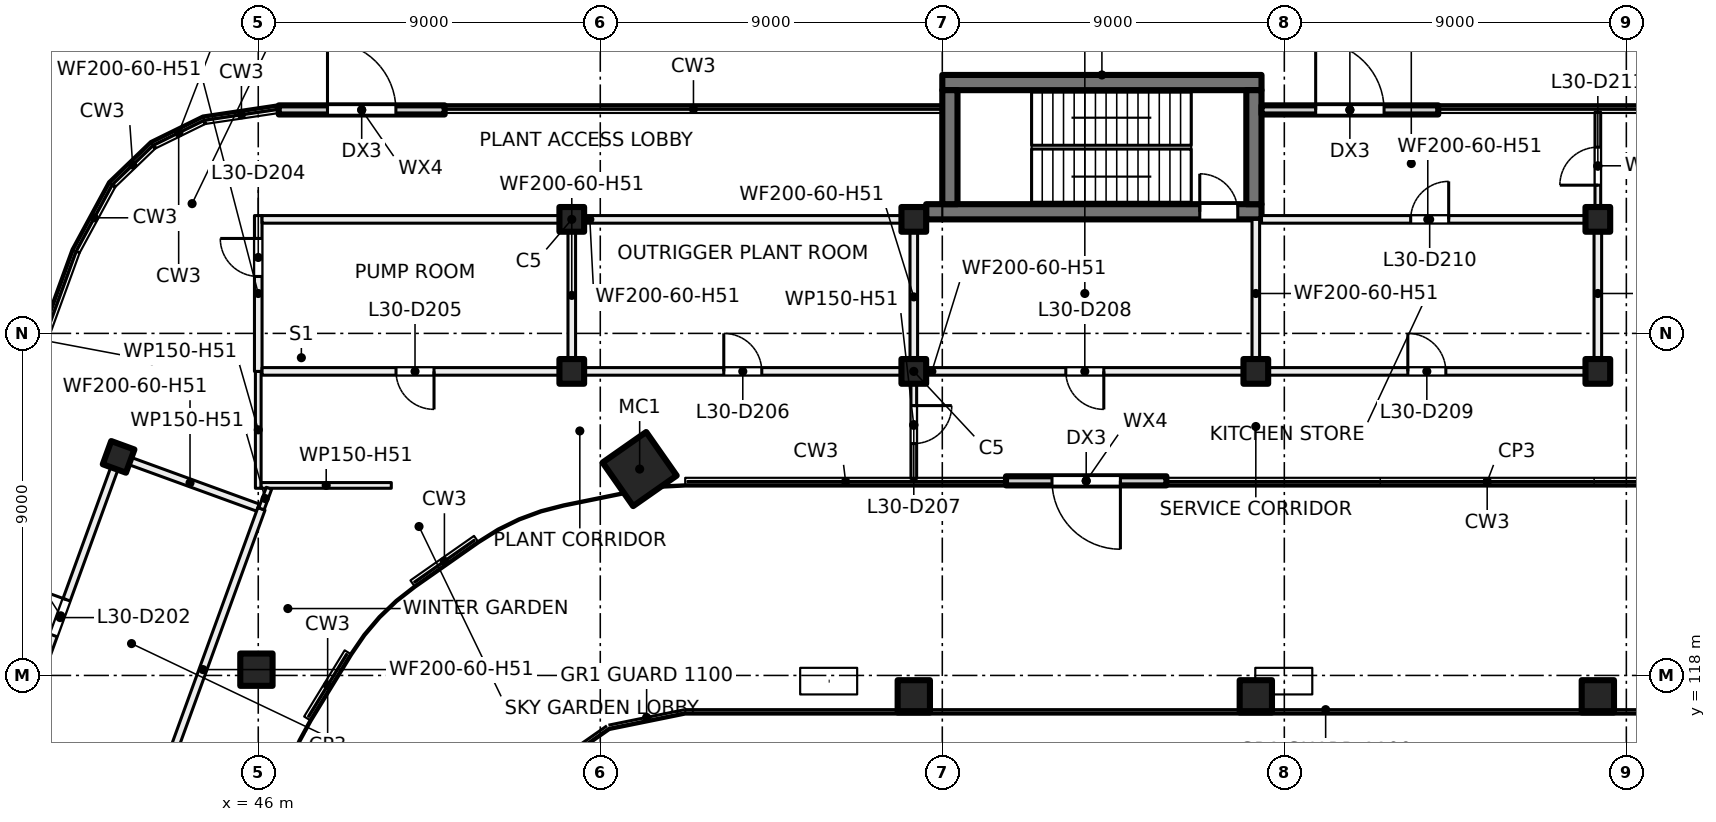
"""IFC4 building model, lengths in metres.
Left out: names, types, materials, properties, quantities, classifications, styles, units other than length and angle.
Written with IfcOpenShell. Run it as: python <this file> out.ifc"""

import sys

from ifc_helpers import new_model, si_unit, direction, frame, frame_2d, origin, origin_2d, place, context, subcontext, project, spatial, rectangle, hollow_rectangle, extrude, element, fill, save


model = new_model("IFC4")
c1 = context("Model", 3, precision=1e-05, world=origin(), true_north=direction((0.0, 1.0)))
c2 = subcontext(c1, "Body", "Model", "MODEL_VIEW")
j1 = project(units=[si_unit("LENGTHUNIT", "METRE"), si_unit("PLANEANGLEUNIT", "RADIAN")], contexts=[c1])
p1 = place(None, origin())
s1 = spatial("IfcSite", under=j1, at=p1, CompositionType="ELEMENT")
p2 = place(p1, origin())
s2 = spatial("IfcBuilding", under=s1, at=p2, CompositionType="ELEMENT")
p3 = place(p2, frame((0.0, 0.0, 129.0)))
s3 = spatial("IfcBuildingStorey", under=s2, at=p3, CompositionType="ELEMENT", Elevation=129.0)
p4 = place(p3, frame((56.036, 123.43, 0.0), z_axis=(0.0, 0.0, 1.0), x_axis=(0.573576436351, -0.819152044289, 0.0)))
e1 = element("IfcColumn", 1, at=p4, inside=s3, PredefinedType="COLUMN", context=c2, shape_type="SweptSolid", body=[
    extrude(hollow_rectangle(XDim=1.4, YDim=1.4, WallThickness=0.04, at=origin_2d()), origin(), (0.0, 0.0, 1.0), 5.5),
])
for number, where, z_axis, x_axis in (
    (2, (54.25, 130.0, 0.0), (0.0, 0.0, 1.0), (1.0, 0.0, 0.0)),
    (3, (63.25, 130.0, 0.0), (0.0, 0.0, 1.0), (1.0, 0.0, 0.0)),
    (4, (81.25, 130.0, 0.0), (0.0, 0.0, 1.0), (1.0, 0.0, 0.0)),
    (5, (54.25, 126.0, 0.0), (0.0, 0.0, 1.0), (1.0, 0.0, 0.0)),
    (6, (63.25, 126.0, 0.0), (0.0, 0.0, 1.0), (1.0, 0.0, 0.0)),
    (7, (72.25, 126.0, 0.0), (0.0, 0.0, 1.0), (1.0, 0.0, 0.0)),
    (8, (81.25, 126.0, 0.0), (0.0, 0.0, 1.0), (1.0, 0.0, 0.0)),
):
    element("IfcColumn", number, at=place(p3, frame(where, z_axis=z_axis, x_axis=x_axis)), inside=s3, PredefinedType="COLUMN", context=c2, shape_type="SweptSolid", body=[
        extrude(rectangle(XDim=0.65, YDim=0.65, at=origin_2d()), origin(), (0.0, 0.0, 1.0), 5.5),
    ])
for number, where, z_axis, x_axis in (
    (9, (45.952, 118.152, 0.0), (0.0, 0.0, 1.0), (1.0, 0.0, 0.0)),
    (10, (63.25, 117.45, 0.0), (0.0, 0.0, 1.0), (1.0, 0.0, 0.0)),
    (11, (72.25, 117.45, 0.0), (0.0, 0.0, 1.0), (1.0, 0.0, 0.0)),
    (12, (81.25, 117.45, 0.0), (0.0, 0.0, 1.0), (1.0, 0.0, 0.0)),
):
    element("IfcColumn", number, at=place(p3, frame(where, z_axis=z_axis, x_axis=x_axis)), inside=s3, PredefinedType="COLUMN", context=c2, shape_type="SweptSolid", body=[
        extrude(rectangle(XDim=0.85, YDim=0.85, at=origin_2d()), origin(), (0.0, 0.0, 1.0), 5.5),
    ])
p5 = place(p3, frame((42.325, 123.751, 0.0), z_axis=(0.0, 0.0, 1.0), x_axis=(-0.342020143326, -0.939692620786, 0.0)))
e13 = element("IfcColumn", 13, at=p5, inside=s3, PredefinedType="COLUMN", context=c2, shape_type="SweptSolid", body=[
    extrude(rectangle(XDim=0.65, YDim=0.65, at=origin_2d()), origin(), (0.0, 0.0, 1.0), 5.5),
])
p6 = place(p3, frame((63.575, 130.2, 0.0), z_axis=(0.0, 0.0, 1.0), x_axis=(1.0, 0.0, 0.0)))
e14 = element("IfcWall", 14, at=p6, inside=s3, PredefinedType="SHEAR", context=c2, shape_type="SweptSolid", body=[
    extrude(rectangle(XDim=8.825, YDim=0.4, at=frame_2d((4.413, 0.0))), origin(), (0.0, 0.0, 1.0), 5.5),
])
p7 = place(p6, frame((7.2, 0.0, 0.0)))
e15 = element("IfcOpeningElement", 15, at=p7, cuts=e14, PredefinedType="OPENING", context=c2, shape_type="SweptSolid", body=[
    extrude(rectangle(XDim=1.0, YDim=2.1, at=frame_2d((0.5, 1.05))), frame((0.0, 0.21, 0.0), z_axis=(0.0, -1.0, 0.0), x_axis=(1.0, 0.0, 0.0)), (0.0, 0.0, 1.0), 0.42),
])
p8 = place(p3, frame((64.0, 133.6, 0.0), z_axis=(0.0, 0.0, 1.0), x_axis=(1.0, 0.0, 0.0)))
e16 = element("IfcWall", 16, at=p8, inside=s3, PredefinedType="SHEAR", context=c2, shape_type="SweptSolid", body=[
    extrude(rectangle(XDim=8.4, YDim=0.4, at=frame_2d((4.2, 0.0))), origin(), (0.0, 0.0, 1.0), 5.5),
])
for number, where, z_axis, x_axis in (
    (17, (64.2, 130.4, 0.0), (0.0, 0.0, 1.0), (0.0, 1.0, 0.0)),
    (18, (72.2, 130.4, 0.0), (0.0, 0.0, 1.0), (0.0, 1.0, 0.0)),
):
    element("IfcWall", number, at=place(p3, frame(where, z_axis=z_axis, x_axis=x_axis)), inside=s3, PredefinedType="SHEAR", context=c2, shape_type="SweptSolid", body=[
        extrude(rectangle(XDim=3.0, YDim=0.4, at=frame_2d((1.5, 0.0))), origin(), (0.0, 0.0, 1.0), 5.5),
    ])
p9 = place(p3, frame((69.897, 123.12, 0.0), z_axis=(0.0, 0.0, 1.0), x_axis=(-1.0, 0.0, 0.0)))
e19 = element("IfcWall", 19, at=p9, inside=s3, PredefinedType="SOLIDWALL", context=c2, shape_type="SweptSolid", body=[
    extrude(rectangle(XDim=4.221, YDim=0.24, at=frame_2d((2.11, 0.0))), origin(), (0.0, 0.0, 1.0), 5.125),
])
p10 = place(p9, frame((1.21, 0.0, 0.0)))
e20 = element("IfcOpeningElement", 20, at=p10, cuts=e19, PredefinedType="OPENING", context=c2, shape_type="SweptSolid", body=[
    extrude(rectangle(XDim=1.8, YDim=2.4, at=frame_2d((0.9, 1.2))), frame((0.0, 0.13, 0.0), z_axis=(0.0, -1.0, 0.0), x_axis=(1.0, 0.0, 0.0)), (0.0, 0.0, 1.0), 0.26),
])
p11 = place(p3, frame((72.4, 132.88, 0.0), z_axis=(0.0, 0.0, 1.0), x_axis=(1.0, 0.0, 0.0)))
e21 = element("IfcWall", 21, at=p11, inside=s3, PredefinedType="SOLIDWALL", context=c2, shape_type="SweptSolid", body=[
    extrude(rectangle(XDim=4.65, YDim=0.24, at=frame_2d((2.325, 0.0))), origin(), (0.0, 0.0, 1.0), 5.125),
])
p12 = place(p11, frame((1.425, 0.0, 0.0)))
e22 = element("IfcOpeningElement", 22, at=p12, cuts=e21, PredefinedType="OPENING", context=c2, shape_type="SweptSolid", body=[
    extrude(rectangle(XDim=1.8, YDim=2.4, at=frame_2d((0.9, 1.2))), frame((0.0, 0.13, 0.0), z_axis=(0.0, -1.0, 0.0), x_axis=(1.0, 0.0, 0.0)), (0.0, 0.0, 1.0), 0.26),
])
p13 = place(p3, frame((46.539, 132.88, 0.0), z_axis=(0.0, 0.0, 1.0), x_axis=(1.0, 0.0, 0.0)))
e23 = element("IfcWall", 23, at=p13, inside=s3, PredefinedType="SOLIDWALL", context=c2, shape_type="SweptSolid", body=[
    extrude(rectangle(XDim=4.365, YDim=0.24, at=frame_2d((2.183, 0.0))), origin(), (0.0, 0.0, 1.0), 5.125),
])
p14 = place(p13, frame((1.283, 0.0, 0.0)))
e24 = element("IfcOpeningElement", 24, at=p14, cuts=e23, PredefinedType="OPENING", context=c2, shape_type="SweptSolid", body=[
    extrude(rectangle(XDim=1.8, YDim=2.4, at=frame_2d((0.9, 1.2))), frame((0.0, 0.13, 0.0), z_axis=(0.0, -1.0, 0.0), x_axis=(1.0, 0.0, 0.0)), (0.0, 0.0, 1.0), 0.26),
])
p15 = place(p3, frame((42.359, 123.845, 0.0), z_axis=(0.0, 0.0, 1.0), x_axis=(-0.341936915144, -0.939722909193, 0.0)))
e25 = element("IfcWall", 25, at=p15, inside=s3, PredefinedType="PARTITIONING", context=c2, shape_type="SweptSolid", body=[
    extrude(rectangle(XDim=9.101, YDim=0.2, at=frame_2d((4.55, 0.0))), origin(), (0.0, 0.0, 1.0), 5.125),
])
p16 = place(p15, frame((4.1, 0.0, 0.0)))
e26 = element("IfcOpeningElement", 26, at=p16, cuts=e25, PredefinedType="OPENING", context=c2, shape_type="SweptSolid", body=[
    extrude(rectangle(XDim=1.0, YDim=2.1, at=frame_2d((0.5, 1.05))), frame((0.0, 0.11, 0.0), z_axis=(0.0, -1.0, 0.0), x_axis=(1.0, 0.0, 0.0)), (0.0, 0.0, 1.0), 0.22),
])
p17 = place(p3, frame((42.419, 123.717, 0.0), z_axis=(0.0, 0.0, 1.0), x_axis=(0.939667689469, -0.342088633789, 0.0)))
e27 = element("IfcWall", 27, at=p17, inside=s3, PredefinedType="PARTITIONING", context=c2, shape_type="SweptSolid", body=[
    extrude(rectangle(XDim=3.8, YDim=0.2, at=frame_2d((1.9, 0.0))), origin(), (0.0, 0.0, 1.0), 5.125),
])
p18 = place(p3, frame((43.006, 113.925, 0.0), z_axis=(0.0, 0.0, 1.0), x_axis=(0.341963022424, 0.939713409128, 0.0)))
e28 = element("IfcWall", 28, at=p18, inside=s3, PredefinedType="PARTITIONING", context=c2, shape_type="SweptSolid", body=[
    extrude(rectangle(XDim=9.001, YDim=0.2, at=frame_2d((4.5, 0.0))), origin(), (0.0, 0.0, 1.0), 5.125),
])
p19 = place(p3, frame((46.0, 122.925, 0.0), z_axis=(0.0, 0.0, 1.0), x_axis=(0.0, 1.0, 0.0)))
e29 = element("IfcWall", 29, at=p19, inside=s3, PredefinedType="PARTITIONING", context=c2, shape_type="SweptSolid", body=[
    extrude(rectangle(XDim=3.075, YDim=0.15, at=frame_2d((1.538, 0.0))), origin(), (0.0, 0.0, 1.0), 5.125),
])
p20 = place(p3, frame((46.075, 123.0, 0.0), z_axis=(0.0, 0.0, 1.0), x_axis=(1.0, 0.0, 0.0)))
e30 = element("IfcWall", 30, at=p20, inside=s3, PredefinedType="PARTITIONING", context=c2, shape_type="SweptSolid", body=[
    extrude(rectangle(XDim=3.426, YDim=0.15, at=frame_2d((1.713, 0.0))), origin(), (0.0, 0.0, 1.0), 5.125),
])
p21 = place(p3, frame((46.0, 130.1, 0.0), z_axis=(0.0, 0.0, 1.0), x_axis=(0.0, -1.0, 0.0)))
e31 = element("IfcWall", 31, at=p21, inside=s3, PredefinedType="PARTITIONING", context=c2, shape_type="SweptSolid", body=[
    extrude(rectangle(XDim=4.1, YDim=0.2, at=frame_2d((2.05, 0.0))), origin(), (0.0, 0.0, 1.0), 5.125),
])
p22 = place(p21, frame((0.602, 0.0, 0.0)))
e32 = element("IfcOpeningElement", 32, at=p22, cuts=e31, PredefinedType="OPENING", context=c2, shape_type="SweptSolid", body=[
    extrude(rectangle(XDim=1.0, YDim=2.1, at=frame_2d((0.5, 1.05))), frame((0.0, 0.11, 0.0), z_axis=(0.0, -1.0, 0.0), x_axis=(1.0, 0.0, 0.0)), (0.0, 0.0, 1.0), 0.22),
])
p23 = place(p3, frame((46.1, 126.0, 0.0), z_axis=(0.0, 0.0, 1.0), x_axis=(1.0, 0.0, 0.0)))
e33 = element("IfcWall", 33, at=p23, inside=s3, PredefinedType="PARTITIONING", context=c2, shape_type="SweptSolid", body=[
    extrude(rectangle(XDim=35.25, YDim=0.2, at=frame_2d((17.625, 0.0))), origin(), (0.0, 0.0, 1.0), 5.125),
])
p24 = place(p23, frame((3.525, 0.0, 0.0)))
e34 = element("IfcOpeningElement", 34, at=p24, cuts=e33, PredefinedType="OPENING", context=c2, shape_type="SweptSolid", body=[
    extrude(rectangle(XDim=1.0, YDim=2.1, at=frame_2d((0.5, 1.05))), frame((0.0, 0.11, 0.0), z_axis=(0.0, -1.0, 0.0), x_axis=(1.0, 0.0, 0.0)), (0.0, 0.0, 1.0), 0.22),
])
p25 = place(p23, frame((12.15, 0.0, 0.0)))
e35 = element("IfcOpeningElement", 35, at=p25, cuts=e33, PredefinedType="OPENING", context=c2, shape_type="SweptSolid", body=[
    extrude(rectangle(XDim=1.0, YDim=2.1, at=frame_2d((0.5, 1.05))), frame((0.0, 0.11, 0.0), z_axis=(0.0, -1.0, 0.0), x_axis=(1.0, 0.0, 0.0)), (0.0, 0.0, 1.0), 0.22),
])
p26 = place(p23, frame((21.15, 0.0, 0.0)))
e36 = element("IfcOpeningElement", 36, at=p26, cuts=e33, PredefinedType="OPENING", context=c2, shape_type="SweptSolid", body=[
    extrude(rectangle(XDim=1.0, YDim=2.1, at=frame_2d((0.5, 1.05))), frame((0.0, 0.11, 0.0), z_axis=(0.0, -1.0, 0.0), x_axis=(1.0, 0.0, 0.0)), (0.0, 0.0, 1.0), 0.22),
])
p27 = place(p23, frame((30.15, 0.0, 0.0)))
e37 = element("IfcOpeningElement", 37, at=p27, cuts=e33, PredefinedType="OPENING", context=c2, shape_type="SweptSolid", body=[
    extrude(rectangle(XDim=1.0, YDim=2.1, at=frame_2d((0.5, 1.05))), frame((0.0, 0.11, 0.0), z_axis=(0.0, -1.0, 0.0), x_axis=(1.0, 0.0, 0.0)), (0.0, 0.0, 1.0), 0.22),
])
p28 = place(p3, frame((46.1, 130.0, 0.0), z_axis=(0.0, 0.0, 1.0), x_axis=(1.0, 0.0, 0.0)))
e38 = element("IfcWall", 38, at=p28, inside=s3, PredefinedType="PARTITIONING", context=c2, shape_type="SweptSolid", body=[
    extrude(rectangle(XDim=17.25, YDim=0.2, at=frame_2d((8.625, 0.0))), origin(), (0.0, 0.0, 1.0), 5.125),
])
p29 = place(p3, frame((46.084, 122.383, 0.0), z_axis=(0.0, 0.0, 1.0), x_axis=(0.343135526399, 0.939285904569, 0.0)))
e39 = element("IfcWall", 39, at=p29, inside=s3, PredefinedType="PARTITIONING", context=c2, shape_type="SweptSolid", body=[
    extrude(rectangle(XDim=0.577, YDim=0.15, at=frame_2d((0.289, 0.0))), origin(), (0.0, 0.0, 1.0), 5.125),
])
p30 = place(p3, frame((54.25, 126.1, 0.0), z_axis=(0.0, 0.0, 1.0), x_axis=(0.0, 1.0, 0.0)))
e40 = element("IfcWall", 40, at=p30, inside=s3, PredefinedType="PARTITIONING", context=c2, shape_type="SweptSolid", body=[
    extrude(rectangle(XDim=3.8, YDim=0.2, at=frame_2d((1.9, 0.0))), origin(), (0.0, 0.0, 1.0), 5.125),
])
p31 = place(p3, frame((63.25, 123.18, 0.0), z_axis=(0.0, 0.0, 1.0), x_axis=(0.0, 1.0, 0.0)))
e41 = element("IfcWall", 41, at=p31, inside=s3, PredefinedType="PARTITIONING", context=c2, shape_type="SweptSolid", body=[
    extrude(rectangle(XDim=2.8, YDim=0.15, at=frame_2d((1.4, 0.0))), origin(), (0.0, 0.0, 1.0), 5.125),
])
p32 = place(p31, frame((0.92, 0.0, 0.0)))
e42 = element("IfcOpeningElement", 42, at=p32, cuts=e41, PredefinedType="OPENING", context=c2, shape_type="SweptSolid", body=[
    extrude(rectangle(XDim=1.0, YDim=2.1, at=frame_2d((0.5, 1.05))), frame((0.0, 0.085, 0.0), z_axis=(0.0, -1.0, 0.0), x_axis=(1.0, 0.0, 0.0)), (0.0, 0.0, 1.0), 0.17),
])
p33 = place(p3, frame((63.25, 126.02, 0.0), z_axis=(0.0, 0.0, 1.0), x_axis=(0.0, 1.0, 0.0)))
e43 = element("IfcWall", 43, at=p33, inside=s3, PredefinedType="PARTITIONING", context=c2, shape_type="SweptSolid", body=[
    extrude(rectangle(XDim=3.88, YDim=0.2, at=frame_2d((1.94, 0.0))), origin(), (0.0, 0.0, 1.0), 5.125),
])
p34 = place(p3, frame((72.25, 126.1, 0.0), z_axis=(0.0, 0.0, 1.0), x_axis=(0.0, 1.0, 0.0)))
e44 = element("IfcWall", 44, at=p34, inside=s3, PredefinedType="PARTITIONING", context=c2, shape_type="SweptSolid", body=[
    extrude(rectangle(XDim=3.9, YDim=0.2, at=frame_2d((1.95, 0.0))), origin(), (0.0, 0.0, 1.0), 5.125),
])
p35 = place(p3, frame((81.15, 130.0, 0.0), z_axis=(0.0, 0.0, 1.0), x_axis=(-1.0, 0.0, 0.0)))
e45 = element("IfcWall", 45, at=p35, inside=s3, PredefinedType="PARTITIONING", context=c2, shape_type="SweptSolid", body=[
    extrude(rectangle(XDim=8.75, YDim=0.2, at=frame_2d((4.375, 0.0))), origin(), (0.0, 0.0, 1.0), 5.125),
])
p36 = place(p35, frame((3.825, 0.0, 0.0)))
e46 = element("IfcOpeningElement", 46, at=p36, cuts=e45, PredefinedType="OPENING", context=c2, shape_type="SweptSolid", body=[
    extrude(rectangle(XDim=1.0, YDim=2.1, at=frame_2d((0.5, 1.05))), frame((0.0, 0.11, 0.0), z_axis=(0.0, -1.0, 0.0), x_axis=(1.0, 0.0, 0.0)), (0.0, 0.0, 1.0), 0.22),
])
p37 = place(p3, frame((81.25, 126.1, 0.0), z_axis=(0.0, 0.0, 1.0), x_axis=(0.0, 1.0, 0.0)))
e47 = element("IfcWall", 47, at=p37, inside=s3, PredefinedType="PARTITIONING", context=c2, shape_type="SweptSolid", body=[
    extrude(rectangle(XDim=3.9, YDim=0.2, at=frame_2d((1.95, 0.0))), origin(), (0.0, 0.0, 1.0), 5.125),
])
p38 = place(p3, frame((81.25, 130.0, 0.0), z_axis=(0.0, 0.0, 1.0), x_axis=(0.0, 1.0, 0.0)))
e48 = element("IfcWall", 48, at=p38, inside=s3, PredefinedType="PARTITIONING", context=c2, shape_type="SweptSolid", body=[
    extrude(rectangle(XDim=2.82, YDim=0.15, at=frame_2d((1.41, 0.0))), origin(), (0.0, 0.0, 1.0), 5.125),
])
p39 = place(p38, frame((0.9, 0.0, 0.0)))
e49 = element("IfcOpeningElement", 49, at=p39, cuts=e48, PredefinedType="OPENING", context=c2, shape_type="SweptSolid", body=[
    extrude(rectangle(XDim=1.0, YDim=2.1, at=frame_2d((0.5, 1.05))), frame((0.0, 0.085, 0.0), z_axis=(0.0, -1.0, 0.0), x_axis=(1.0, 0.0, 0.0)), (0.0, 0.0, 1.0), 0.17),
])
p40 = place(p10, origin())
e50 = element("IfcDoor", 50, at=p40, inside=s3, OperationType="DOUBLE_DOOR_SINGLE_SWING", PredefinedType="DOOR", context=c2, shape_type="SweptSolid", body=[
    extrude(rectangle(XDim=1.8, YDim=2.4, at=frame_2d((0.9, 1.2))), frame((0.0, 0.025, 0.0), z_axis=(0.0, -1.0, 0.0), x_axis=(1.0, 0.0, 0.0)), (0.0, 0.0, 1.0), 0.05),
])
fill(e20, e50)
p41 = place(p12, origin())
e51 = element("IfcDoor", 51, at=p41, inside=s3, OperationType="DOUBLE_DOOR_SINGLE_SWING", PredefinedType="DOOR", context=c2, shape_type="SweptSolid", body=[
    extrude(rectangle(XDim=1.8, YDim=2.4, at=frame_2d((0.9, 1.2))), frame((0.0, 0.025, 0.0), z_axis=(0.0, -1.0, 0.0), x_axis=(1.0, 0.0, 0.0)), (0.0, 0.0, 1.0), 0.05),
])
fill(e22, e51)
p42 = place(p14, origin())
e52 = element("IfcDoor", 52, at=p42, inside=s3, OperationType="DOUBLE_DOOR_SINGLE_SWING", PredefinedType="DOOR", context=c2, shape_type="SweptSolid", body=[
    extrude(rectangle(XDim=1.8, YDim=2.4, at=frame_2d((0.9, 1.2))), frame((0.0, 0.025, 0.0), z_axis=(0.0, -1.0, 0.0), x_axis=(1.0, 0.0, 0.0)), (0.0, 0.0, 1.0), 0.05),
])
fill(e24, e52)
p43 = place(p7, origin())
e53 = element("IfcDoor", 53, at=p43, inside=s3, OperationType="SINGLE_SWING_LEFT", PredefinedType="DOOR", context=c2, shape_type="SweptSolid", body=[
    extrude(rectangle(XDim=1.0, YDim=2.1, at=frame_2d((0.5, 1.05))), frame((0.0, 0.025, 0.0), z_axis=(0.0, -1.0, 0.0), x_axis=(1.0, 0.0, 0.0)), (0.0, 0.0, 1.0), 0.05),
])
fill(e15, e53)
p44 = place(p16, origin())
e54 = element("IfcDoor", 54, at=p44, inside=s3, OperationType="SINGLE_SWING_LEFT", PredefinedType="DOOR", context=c2, shape_type="SweptSolid", body=[
    extrude(rectangle(XDim=1.0, YDim=2.1, at=frame_2d((0.5, 1.05))), frame((0.0, 0.025, 0.0), z_axis=(0.0, -1.0, 0.0), x_axis=(1.0, 0.0, 0.0)), (0.0, 0.0, 1.0), 0.05),
])
fill(e26, e54)
p45 = place(p22, origin())
e55 = element("IfcDoor", 55, at=p45, inside=s3, OperationType="SINGLE_SWING_LEFT", PredefinedType="DOOR", context=c2, shape_type="SweptSolid", body=[
    extrude(rectangle(XDim=1.0, YDim=2.1, at=frame_2d((0.5, 1.05))), frame((0.0, 0.025, 0.0), z_axis=(0.0, -1.0, 0.0), x_axis=(1.0, 0.0, 0.0)), (0.0, 0.0, 1.0), 0.05),
])
fill(e32, e55)
p46 = place(p24, origin())
e56 = element("IfcDoor", 56, at=p46, inside=s3, OperationType="SINGLE_SWING_RIGHT", PredefinedType="DOOR", context=c2, shape_type="SweptSolid", body=[
    extrude(rectangle(XDim=1.0, YDim=2.1, at=frame_2d((0.5, 1.05))), frame((0.0, 0.025, 0.0), z_axis=(0.0, -1.0, 0.0), x_axis=(1.0, 0.0, 0.0)), (0.0, 0.0, 1.0), 0.05),
])
fill(e34, e56)
p47 = place(p25, origin())
e57 = element("IfcDoor", 57, at=p47, inside=s3, OperationType="SINGLE_SWING_LEFT", PredefinedType="DOOR", context=c2, shape_type="SweptSolid", body=[
    extrude(rectangle(XDim=1.0, YDim=2.1, at=frame_2d((0.5, 1.05))), frame((0.0, 0.025, 0.0), z_axis=(0.0, -1.0, 0.0), x_axis=(1.0, 0.0, 0.0)), (0.0, 0.0, 1.0), 0.05),
])
fill(e35, e57)
p48 = place(p32, origin())
e58 = element("IfcDoor", 58, at=p48, inside=s3, OperationType="SINGLE_SWING_RIGHT", PredefinedType="DOOR", context=c2, shape_type="SweptSolid", body=[
    extrude(rectangle(XDim=1.0, YDim=2.1, at=frame_2d((0.5, 1.05))), frame((0.0, 0.025, 0.0), z_axis=(0.0, -1.0, 0.0), x_axis=(1.0, 0.0, 0.0)), (0.0, 0.0, 1.0), 0.05),
])
fill(e42, e58)
p49 = place(p26, origin())
e59 = element("IfcDoor", 59, at=p49, inside=s3, OperationType="SINGLE_SWING_RIGHT", PredefinedType="DOOR", context=c2, shape_type="SweptSolid", body=[
    extrude(rectangle(XDim=1.0, YDim=2.1, at=frame_2d((0.5, 1.05))), frame((0.0, 0.025, 0.0), z_axis=(0.0, -1.0, 0.0), x_axis=(1.0, 0.0, 0.0)), (0.0, 0.0, 1.0), 0.05),
])
fill(e36, e59)
p50 = place(p27, origin())
e60 = element("IfcDoor", 60, at=p50, inside=s3, OperationType="SINGLE_SWING_LEFT", PredefinedType="DOOR", context=c2, shape_type="SweptSolid", body=[
    extrude(rectangle(XDim=1.0, YDim=2.1, at=frame_2d((0.5, 1.05))), frame((0.0, 0.025, 0.0), z_axis=(0.0, -1.0, 0.0), x_axis=(1.0, 0.0, 0.0)), (0.0, 0.0, 1.0), 0.05),
])
fill(e37, e60)
p51 = place(p36, origin())
e61 = element("IfcDoor", 61, at=p51, inside=s3, OperationType="SINGLE_SWING_LEFT", PredefinedType="DOOR", context=c2, shape_type="SweptSolid", body=[
    extrude(rectangle(XDim=1.0, YDim=2.1, at=frame_2d((0.5, 1.05))), frame((0.0, 0.025, 0.0), z_axis=(0.0, -1.0, 0.0), x_axis=(1.0, 0.0, 0.0)), (0.0, 0.0, 1.0), 0.05),
])
fill(e46, e61)
p52 = place(p39, origin())
e62 = element("IfcDoor", 62, at=p52, inside=s3, OperationType="SINGLE_SWING_LEFT", PredefinedType="DOOR", context=c2, shape_type="SweptSolid", body=[
    extrude(rectangle(XDim=1.0, YDim=2.1, at=frame_2d((0.5, 1.05))), frame((0.0, 0.025, 0.0), z_axis=(0.0, -1.0, 0.0), x_axis=(1.0, 0.0, 0.0)), (0.0, 0.0, 1.0), 0.05),
])
fill(e49, e62)
save(model, sys.argv[1])
